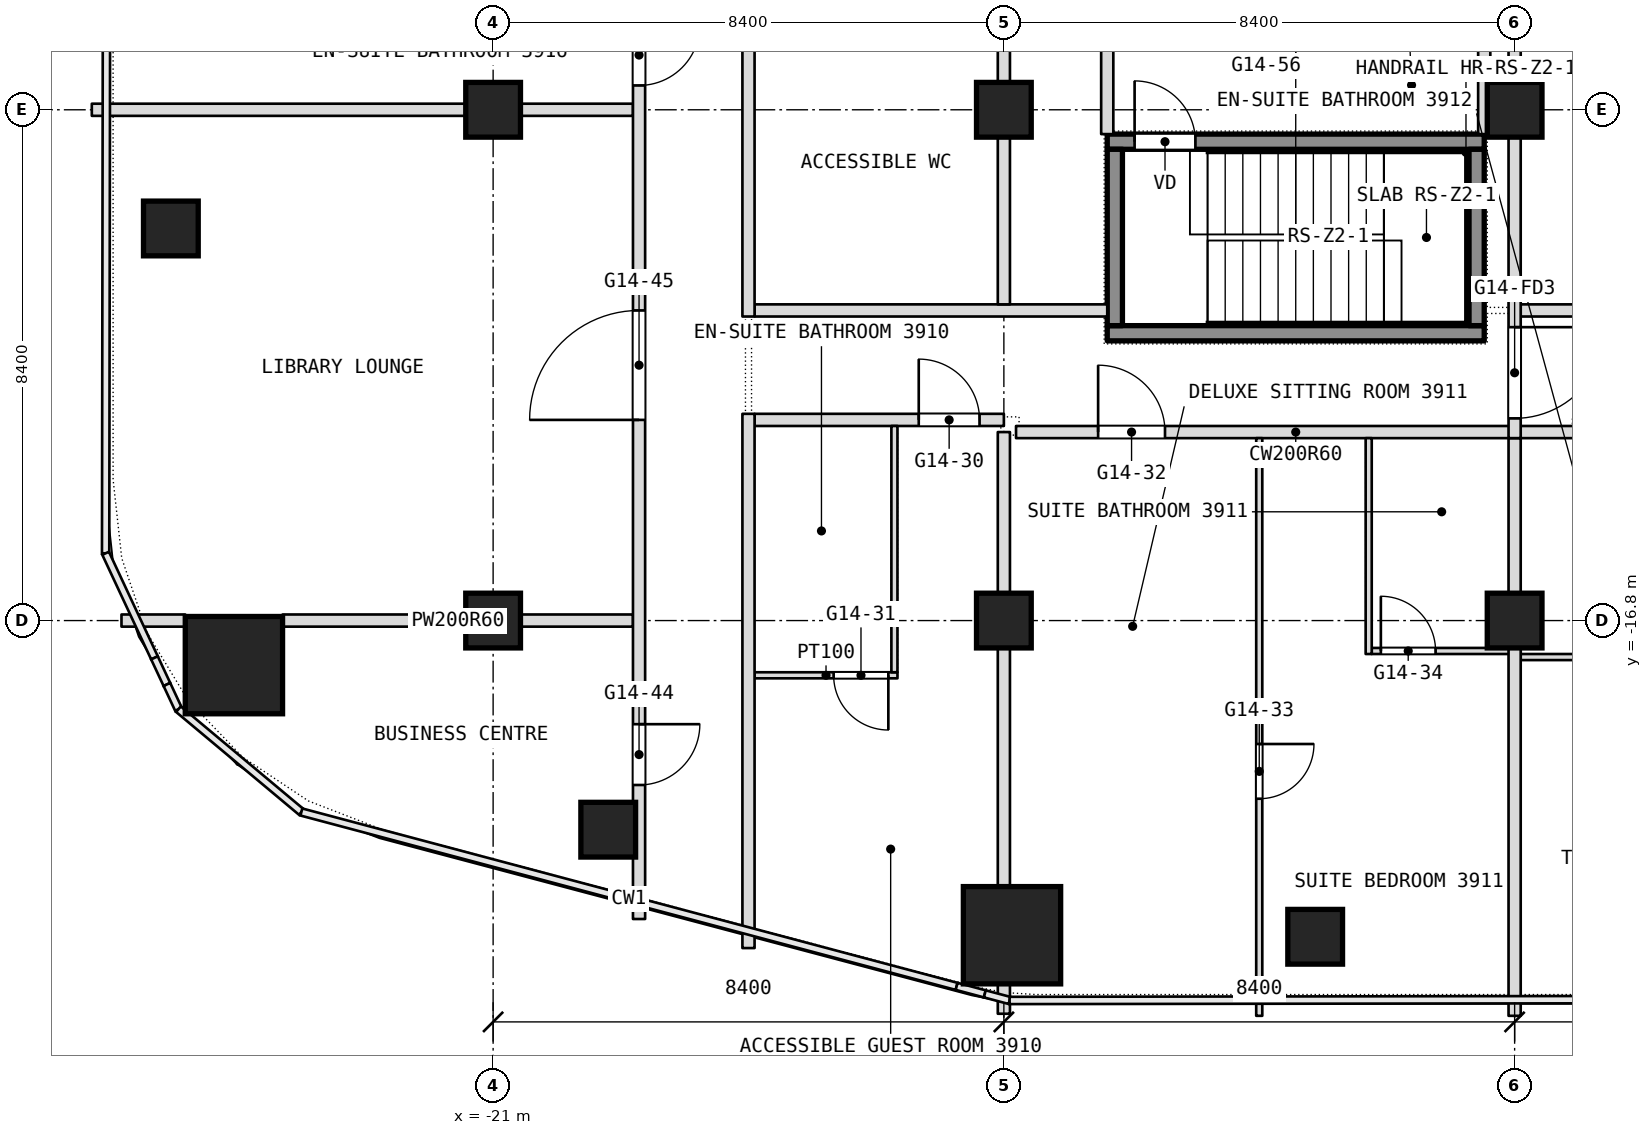
"""IFC4 building model, lengths in metres.
Left out: names, types, materials, properties, quantities, classifications, styles, units other than length and angle.
Written with IfcOpenShell. Run it as: python <this file> out.ifc"""

import sys

from ifc_helpers import new_model, si_unit, direction, frame, frame_2d, origin, origin_2d, place, context, subcontext, project, spatial, rectangle, extrude, element, fill, save


model = new_model("IFC4")
c1 = context("Model", 3, precision=1e-05, world=origin(), true_north=direction((0.0, 1.0)))
c2 = subcontext(c1, "Body", "Model", "MODEL_VIEW")
j1 = project(units=[si_unit("LENGTHUNIT", "METRE"), si_unit("PLANEANGLEUNIT", "RADIAN")], contexts=[c1])
p1 = place(None, origin())
s1 = spatial("IfcSite", under=j1, at=p1, CompositionType="ELEMENT")
p2 = place(p1, origin())
s2 = spatial("IfcBuilding", under=s1, at=p2, CompositionType="ELEMENT")
p3 = place(p2, frame((0.0, 0.0, 166.1)))
s3 = spatial("IfcBuildingStorey", under=s2, at=p3, CompositionType="ELEMENT", Elevation=166.1)
for number, where, z_axis, x_axis in (
    (1, (-25.263, -17.533, 0.0), (0.0, 0.0, 1.0), (1.0, 0.0, 0.0)),
    (2, (-12.466, -21.975, 0.0), (0.0, 0.0, 1.0), (1.0, 0.0, 0.0)),
):
    element("IfcColumn", number, at=place(p3, frame(where, z_axis=z_axis, x_axis=x_axis)), inside=s3, PredefinedType="COLUMN", context=c2, shape_type="SweptSolid", body=[
        extrude(rectangle(XDim=1.6, YDim=1.6, at=origin_2d()), origin(), (0.0, 0.0, 1.0), 3.6),
    ])
for number, where, z_axis, x_axis in (
    (3, (-21.0, -16.8, 0.0), (0.0, 0.0, 1.0), (1.0, 0.0, 0.0)),
    (4, (-21.0, -8.4, 0.0), (0.0, 0.0, 1.0), (1.0, 0.0, 0.0)),
    (5, (-12.6, -16.8, 0.0), (0.0, 0.0, 1.0), (1.0, 0.0, 0.0)),
    (6, (-12.6, -8.4, 0.0), (0.0, 0.0, 1.0), (1.0, 0.0, 0.0)),
    (7, (-4.2, -16.8, 0.0), (0.0, 0.0, 1.0), (1.0, 0.0, 0.0)),
    (8, (-4.2, -8.4, 0.0), (0.0, 0.0, 1.0), (1.0, 0.0, 0.0)),
    (9, (-26.3, -10.352, 0.0), (0.0, 0.0, 1.0), (1.0, 0.0, 0.0)),
    (10, (-7.48, -22.0, 0.0), (0.0, 0.0, 1.0), (1.0, 0.0, 0.0)),
    (11, (-19.107, -20.239, 0.0), (0.0, 0.0, 1.0), (1.0, 0.0, 0.0)),
):
    element("IfcColumn", number, at=place(p3, frame(where, z_axis=z_axis, x_axis=x_axis)), inside=s3, PredefinedType="COLUMN", context=c2, shape_type="SweptSolid", body=[
        extrude(rectangle(XDim=0.9, YDim=0.9, at=origin_2d()), origin(), (0.0, 0.0, 1.0), 3.6),
    ])
p4 = place(p3, frame((-16.7, -17.7, 0.0), z_axis=(0.0, 0.0, 1.0), x_axis=(1.0, 0.0, 0.0)))
e12 = element("IfcWall", 12, at=p4, inside=s3, PredefinedType="PARTITIONING", context=c2, shape_type="SweptSolid", body=[
    extrude(rectangle(XDim=2.35, YDim=0.1, at=frame_2d((1.175, 0.0))), origin(), (0.0, 0.0, 1.0), 3.3),
])
p5 = place(p4, frame((1.3, 0.0, 0.0)))
e13 = element("IfcOpeningElement", 13, at=p5, cuts=e12, PredefinedType="OPENING", context=c2, shape_type="SweptSolid", body=[
    extrude(rectangle(XDim=0.9, YDim=2.1, at=frame_2d((0.45, 1.05))), frame((0.0, 0.05, 0.0), z_axis=(0.0, -1.0, 0.0), x_axis=(1.0, 0.0, 0.0)), (0.0, 0.0, 1.0), 0.1),
])
p6 = place(p3, frame((-4.1, -17.4, 0.0), z_axis=(0.0, 0.0, 1.0), x_axis=(1.0, 0.0, 0.0)))
e14 = element("IfcWall", 14, at=p6, inside=s3, PredefinedType="PARTITIONING", context=c2, shape_type="SweptSolid", body=[
    extrude(rectangle(XDim=2.35, YDim=0.1, at=frame_2d((1.175, 0.0))), origin(), (0.0, 0.0, 1.0), 3.3),
])
p7 = place(p6, frame((1.3, 0.0, 0.0)))
e15 = element("IfcOpeningElement", 15, at=p7, cuts=e14, PredefinedType="OPENING", context=c2, shape_type="SweptSolid", body=[
    extrude(rectangle(XDim=0.9, YDim=2.1, at=frame_2d((0.45, 1.05))), frame((0.0, 0.05, 0.0), z_axis=(0.0, -1.0, 0.0), x_axis=(1.0, 0.0, 0.0)), (0.0, 0.0, 1.0), 0.1),
])
p8 = place(p3, frame((-6.55, -17.3, 0.0), z_axis=(0.0, 0.0, 1.0), x_axis=(1.0, 0.0, 0.0)))
e16 = element("IfcWall", 16, at=p8, inside=s3, PredefinedType="PARTITIONING", context=c2, shape_type="SweptSolid", body=[
    extrude(rectangle(XDim=2.45, YDim=0.1, at=frame_2d((1.225, 0.0))), origin(), (0.0, 0.0, 1.0), 3.3),
])
p9 = place(p8, frame((0.15, 0.0, 0.0)))
e17 = element("IfcOpeningElement", 17, at=p9, cuts=e16, PredefinedType="OPENING", context=c2, shape_type="SweptSolid", body=[
    extrude(rectangle(XDim=0.9, YDim=2.1, at=frame_2d((0.45, 1.05))), frame((0.0, 0.05, 0.0), z_axis=(0.0, -1.0, 0.0), x_axis=(1.0, 0.0, 0.0)), (0.0, 0.0, 1.0), 0.1),
])
p10 = place(p3, frame((-27.112, -16.8, 0.0), z_axis=(0.0, 0.0, 1.0), x_axis=(1.0, 0.0, 0.0)))
e18 = element("IfcWall", 18, at=p10, inside=s3, PredefinedType="PARTITIONING", context=c2, shape_type="SweptSolid", body=[
    extrude(rectangle(XDim=1.049, YDim=0.2, at=frame_2d((0.524, 0.0))), origin(), (0.0, 0.0, 1.0), 3.3),
])
p11 = place(p3, frame((-24.463, -16.8, 0.0), z_axis=(0.0, 0.0, 1.0), x_axis=(1.0, 0.0, 0.0)))
e19 = element("IfcWall", 19, at=p11, inside=s3, PredefinedType="PARTITIONING", context=c2, shape_type="SweptSolid", body=[
    extrude(rectangle(XDim=5.763, YDim=0.2, at=frame_2d((2.881, 0.0))), origin(), (0.0, 0.0, 1.0), 2.85),
])
p12 = place(p3, frame((-12.4, -13.7, 0.0), z_axis=(0.0, 0.0, 1.0), x_axis=(1.0, 0.0, 0.0)))
e20 = element("IfcWall", 20, at=p12, inside=s3, PredefinedType="PARTITIONING", context=c2, shape_type="SweptSolid", body=[
    extrude(rectangle(XDim=9.2, YDim=0.2, at=frame_2d((4.6, 0.0))), origin(), (0.0, 0.0, 1.0), 3.3),
])
p13 = place(p12, frame((1.35, 0.0, 0.0)))
e21 = element("IfcOpeningElement", 21, at=p13, cuts=e20, PredefinedType="OPENING", context=c2, shape_type="SweptSolid", body=[
    extrude(rectangle(XDim=1.1, YDim=2.1, at=frame_2d((0.55, 1.05))), frame((0.0, 0.1, 0.0), z_axis=(0.0, -1.0, 0.0), x_axis=(1.0, 0.0, 0.0)), (0.0, 0.0, 1.0), 0.2),
])
p14 = place(p3, frame((-16.7, -13.5, 0.0), z_axis=(0.0, 0.0, 1.0), x_axis=(1.0, 0.0, 0.0)))
e22 = element("IfcWall", 22, at=p14, inside=s3, PredefinedType="PARTITIONING", context=c2, shape_type="SweptSolid", body=[
    extrude(rectangle(XDim=4.1, YDim=0.2, at=frame_2d((2.05, 0.0))), origin(), (0.0, 0.0, 1.0), 3.3),
])
p15 = place(p14, frame((2.7, 0.0, 0.0)))
e23 = element("IfcOpeningElement", 23, at=p15, cuts=e22, PredefinedType="OPENING", context=c2, shape_type="SweptSolid", body=[
    extrude(rectangle(XDim=1.0, YDim=2.1, at=frame_2d((0.5, 1.05))), frame((0.0, 0.1, 0.0), z_axis=(0.0, -1.0, 0.0), x_axis=(1.0, 0.0, 0.0)), (0.0, 0.0, 1.0), 0.2),
])
p16 = place(p3, frame((-16.7, -11.7, 0.0), z_axis=(0.0, 0.0, 1.0), x_axis=(1.0, 0.0, 0.0)))
e24 = element("IfcWall", 24, at=p16, inside=s3, PredefinedType="PARTITIONING", context=c2, shape_type="SweptSolid", body=[
    extrude(rectangle(XDim=5.8, YDim=0.2, at=frame_2d((2.9, 0.0))), origin(), (0.0, 0.0, 1.0), 3.3),
])
p17 = place(p3, frame((-4.1, -11.7, 0.0), z_axis=(0.0, 0.0, 1.0), x_axis=(1.0, 0.0, 0.0)))
e25 = element("IfcWall", 25, at=p17, inside=s3, PredefinedType="PARTITIONING", context=c2, shape_type="SweptSolid", body=[
    extrude(rectangle(XDim=20.8, YDim=0.2, at=frame_2d((10.4, 0.0))), origin(), (0.0, 0.0, 1.0), 3.3),
])
p18 = place(p17, frame((14.1, 0.0, 0.0)))
e26 = element("IfcOpeningElement", 26, at=p18, cuts=e25, PredefinedType="OPENING", context=c2, shape_type="SweptSolid", body=[
    extrude(rectangle(XDim=1.0, YDim=2.1, at=frame_2d((0.5, 1.05))), frame((0.0, 0.1, 0.0), z_axis=(0.0, -1.0, 0.0), x_axis=(1.0, 0.0, 0.0)), (0.0, 0.0, 1.0), 0.2),
])
p19 = place(p17, frame((5.7, 0.0, 0.0)))
e27 = element("IfcOpeningElement", 27, at=p19, cuts=e25, PredefinedType="OPENING", context=c2, shape_type="SweptSolid", body=[
    extrude(rectangle(XDim=1.0, YDim=2.1, at=frame_2d((0.5, 1.05))), frame((0.0, 0.1, 0.0), z_axis=(0.0, -1.0, 0.0), x_axis=(1.0, 0.0, 0.0)), (0.0, 0.0, 1.0), 0.2),
])
p20 = place(p3, frame((-27.6, -8.4, 0.0), z_axis=(0.0, 0.0, 1.0), x_axis=(1.0, 0.0, 0.0)))
e28 = element("IfcWall", 28, at=p20, inside=s3, PredefinedType="PARTITIONING", context=c2, shape_type="SweptSolid", body=[
    extrude(rectangle(XDim=8.9, YDim=0.2, at=frame_2d((4.45, 0.0))), origin(), (0.0, 0.0, 1.0), 2.85),
])
p21 = place(p3, frame((-4.2, -23.3, 0.0), z_axis=(0.0, 0.0, 1.0), x_axis=(0.0, 1.0, 0.0)))
e29 = element("IfcWall", 29, at=p21, inside=s3, PredefinedType="PARTITIONING", context=c2, shape_type="SweptSolid", body=[
    extrude(rectangle(XDim=9.5, YDim=0.2, at=frame_2d((4.75, 0.0))), origin(), (0.0, 0.0, 1.0), 2.486),
])
p22 = place(p3, frame((-4.2, -13.8, 0.0), z_axis=(0.0, 0.0, 1.0), x_axis=(0.0, 1.0, 0.0)))
e30 = element("IfcWall", 30, at=p22, inside=s3, PredefinedType="PARTITIONING", context=c2, shape_type="SweptSolid", body=[
    extrude(rectangle(XDim=13.8, YDim=0.2, at=frame_2d((6.9, 0.0))), origin(), (0.0, 0.0, 1.0), 2.486),
])
p23 = place(p22, frame((12.15, 0.0, 0.0)))
e31 = element("IfcOpeningElement", 31, at=p23, cuts=e30, PredefinedType="OPENING", context=c2, shape_type="SweptSolid", body=[
    extrude(rectangle(XDim=1.5, YDim=2.1, at=frame_2d((0.75, 1.05))), frame((0.0, 0.1, 0.0), z_axis=(0.0, -1.0, 0.0), x_axis=(1.0, 0.0, 0.0)), (0.0, 0.0, 1.0), 0.2),
])
p24 = place(p22, frame((0.325, 0.0, 0.0)))
e32 = element("IfcOpeningElement", 32, at=p24, cuts=e30, PredefinedType="OPENING", context=c2, shape_type="SweptSolid", body=[
    extrude(rectangle(XDim=1.5, YDim=2.1, at=frame_2d((0.75, 1.05))), frame((0.0, 0.1, 0.0), z_axis=(0.0, -1.0, 0.0), x_axis=(1.0, 0.0, 0.0)), (0.0, 0.0, 1.0), 0.2),
])
p25 = place(p3, frame((-4.7, -8.8, 0.0), z_axis=(0.0, 0.0, 1.0), x_axis=(0.0, 1.0, 0.0)))
e33 = element("IfcWall", 33, at=p25, inside=s3, PredefinedType="PARTITIONING", context=c2, shape_type="SweptSolid", body=[
    extrude(rectangle(XDim=1.7, YDim=0.2, at=frame_2d((0.85, 0.0))), origin(), (0.0, 0.0, 1.0), 3.3),
])
p26 = place(p3, frame((-6.6, -17.35, 0.0), z_axis=(0.0, 0.0, 1.0), x_axis=(0.0, 1.0, 0.0)))
e34 = element("IfcWall", 34, at=p26, inside=s3, PredefinedType="PARTITIONING", context=c2, shape_type="SweptSolid", body=[
    extrude(rectangle(XDim=3.55, YDim=0.1, at=frame_2d((1.775, 0.0))), origin(), (0.0, 0.0, 1.0), 3.3),
])
p27 = place(p3, frame((-8.4, -23.3, 0.0), z_axis=(0.0, 0.0, 1.0), x_axis=(0.0, 1.0, 0.0)))
e35 = element("IfcWall", 35, at=p27, inside=s3, PredefinedType="PARTITIONING", context=c2, shape_type="SweptSolid", body=[
    extrude(rectangle(XDim=9.5, YDim=0.1, at=frame_2d((4.75, 0.0))), origin(), (0.0, 0.0, 1.0), 3.3),
])
p28 = place(p27, frame((3.57, 0.0, 0.0)))
e36 = element("IfcOpeningElement", 36, at=p28, cuts=e35, PredefinedType="OPENING", context=c2, shape_type="SweptSolid", body=[
    extrude(rectangle(XDim=0.9, YDim=2.1, at=frame_2d((0.45, 1.05))), frame((0.0, 0.05, 0.0), z_axis=(0.0, -1.0, 0.0), x_axis=(1.0, 0.0, 0.0)), (0.0, 0.0, 1.0), 0.1),
])
p29 = place(p3, frame((-10.9, -8.8, 0.0), z_axis=(0.0, 0.0, 1.0), x_axis=(0.0, 1.0, 0.0)))
e37 = element("IfcWall", 37, at=p29, inside=s3, PredefinedType="PARTITIONING", context=c2, shape_type="SweptSolid", body=[
    extrude(rectangle(XDim=1.5, YDim=0.2, at=frame_2d((0.75, 0.0))), origin(), (0.0, 0.0, 1.0), 3.3),
])
p30 = place(p3, frame((-12.6, -23.266, 0.0), z_axis=(0.0, 0.0, 1.0), x_axis=(0.0, 1.0, 0.0)))
e38 = element("IfcWall", 38, at=p30, inside=s3, PredefinedType="PARTITIONING", context=c2, shape_type="SweptSolid", body=[
    extrude(rectangle(XDim=0.491, YDim=0.2, at=frame_2d((0.246, 0.0))), origin(), (0.0, 0.0, 1.0), 3.3),
])
p31 = place(p3, frame((-12.6, -21.175, 0.0), z_axis=(0.0, 0.0, 1.0), x_axis=(0.0, 1.0, 0.0)))
e39 = element("IfcWall", 39, at=p31, inside=s3, PredefinedType="PARTITIONING", context=c2, shape_type="SweptSolid", body=[
    extrude(rectangle(XDim=7.475, YDim=0.2, at=frame_2d((3.738, 0.0))), origin(), (0.0, 0.0, 1.0), 2.486),
])
p32 = place(p3, frame((-12.6, -11.6, 0.0), z_axis=(0.0, 0.0, 1.0), x_axis=(0.0, 1.0, 0.0)))
e40 = element("IfcWall", 40, at=p32, inside=s3, PredefinedType="PARTITIONING", context=c2, shape_type="SweptSolid", body=[
    extrude(rectangle(XDim=9.7, YDim=0.2, at=frame_2d((4.85, 0.0))), origin(), (0.0, 0.0, 1.0), 2.486),
])
p33 = place(p3, frame((-14.4, -17.65, 0.0), z_axis=(0.0, 0.0, 1.0), x_axis=(0.0, 1.0, 0.0)))
e41 = element("IfcWall", 41, at=p33, inside=s3, PredefinedType="PARTITIONING", context=c2, shape_type="SweptSolid", body=[
    extrude(rectangle(XDim=4.05, YDim=0.1, at=frame_2d((2.025, 0.0))), origin(), (0.0, 0.0, 1.0), 3.3),
])
p34 = place(p3, frame((-16.8, -22.186, 0.0), z_axis=(0.0, 0.0, 1.0), x_axis=(0.0, 1.0, 0.0)))
e42 = element("IfcWall", 42, at=p34, inside=s3, PredefinedType="PARTITIONING", context=c2, shape_type="SweptSolid", body=[
    extrude(rectangle(XDim=8.786, YDim=0.2, at=frame_2d((4.393, 0.0))), origin(), (0.0, 0.0, 1.0), 3.3),
])
p35 = place(p3, frame((-16.8, -11.8, 0.0), z_axis=(0.0, 0.0, 1.0), x_axis=(0.0, 1.0, 0.0)))
e43 = element("IfcWall", 43, at=p35, inside=s3, PredefinedType="PARTITIONING", context=c2, shape_type="SweptSolid", body=[
    extrude(rectangle(XDim=9.9, YDim=0.2, at=frame_2d((4.95, 0.0))), origin(), (0.0, 0.0, 1.0), 3.3),
])
p36 = place(p3, frame((-18.6, -21.708, 0.0), z_axis=(0.0, 0.0, 1.0), x_axis=(0.0, 1.0, 0.0)))
e44 = element("IfcWall", 44, at=p36, inside=s3, PredefinedType="PARTITIONING", context=c2, shape_type="SweptSolid", body=[
    extrude(rectangle(XDim=28.608, YDim=0.2, at=frame_2d((14.304, 0.0))), origin(), (0.0, 0.0, 1.0), 3.3),
])
p37 = place(p36, frame((2.204, 0.0, 0.0)))
e45 = element("IfcOpeningElement", 45, at=p37, cuts=e44, PredefinedType="OPENING", context=c2, shape_type="SweptSolid", body=[
    extrude(rectangle(XDim=1.0, YDim=2.1, at=frame_2d((0.5, 1.05))), frame((0.0, 0.1, 0.0), z_axis=(0.0, -1.0, 0.0), x_axis=(1.0, 0.0, 0.0)), (0.0, 0.0, 1.0), 0.2),
])
p38 = place(p36, frame((8.208, 0.0, 0.0)))
e46 = element("IfcOpeningElement", 46, at=p38, cuts=e44, PredefinedType="OPENING", context=c2, shape_type="SweptSolid", body=[
    extrude(rectangle(XDim=1.8, YDim=2.1, at=frame_2d((0.9, 1.05))), frame((0.0, 0.1, 0.0), z_axis=(0.0, -1.0, 0.0), x_axis=(1.0, 0.0, 0.0)), (0.0, 0.0, 1.0), 0.2),
])
p39 = place(p36, frame((13.708, 0.0, 0.0)))
e47 = element("IfcOpeningElement", 47, at=p39, cuts=e44, PredefinedType="OPENING", context=c2, shape_type="SweptSolid", body=[
    extrude(rectangle(XDim=1.0, YDim=2.1, at=frame_2d((0.5, 1.05))), frame((0.0, 0.1, 0.0), z_axis=(0.0, -1.0, 0.0), x_axis=(1.0, 0.0, 0.0)), (0.0, 0.0, 1.0), 0.2),
])
p40 = place(p36, frame((20.308, 0.0, 0.0)))
e48 = element("IfcOpeningElement", 48, at=p40, cuts=e44, PredefinedType="OPENING", context=c2, shape_type="SweptSolid", body=[
    extrude(rectangle(XDim=1.0, YDim=2.1, at=frame_2d((0.5, 1.05))), frame((0.0, 0.1, 0.0), z_axis=(0.0, -1.0, 0.0), x_axis=(1.0, 0.0, 0.0)), (0.0, 0.0, 1.0), 0.2),
])
p41 = place(p3, frame((-10.9, -12.075, 0.1), z_axis=(0.0, 0.0, 1.0), x_axis=(1.0, 0.0, 0.0)))
e49 = element("IfcWall", 49, at=p41, inside=s3, PredefinedType="SHEAR", context=c2, shape_type="SweptSolid", body=[
    extrude(rectangle(XDim=6.2, YDim=0.25, at=frame_2d((3.1, 0.0))), origin(), (0.0, 0.0, 1.0), 3.6),
])
p42 = place(p3, frame((-10.9, -8.925, 0.1), z_axis=(0.0, 0.0, 1.0), x_axis=(1.0, 0.0, 0.0)))
e50 = element("IfcWall", 50, at=p42, inside=s3, PredefinedType="SHEAR", context=c2, shape_type="SweptSolid", body=[
    extrude(rectangle(XDim=6.2, YDim=0.25, at=frame_2d((3.1, 0.0))), origin(), (0.0, 0.0, 1.0), 3.6),
])
p43 = place(p42, frame((0.45, 0.0, 0.0)))
e51 = element("IfcOpeningElement", 51, at=p43, cuts=e50, PredefinedType="OPENING", context=c2, shape_type="SweptSolid", body=[
    extrude(rectangle(XDim=1.0, YDim=2.1, at=frame_2d((0.5, 1.05))), frame((0.0, 0.125, 0.0), z_axis=(0.0, -1.0, 0.0), x_axis=(1.0, 0.0, 0.0)), (0.0, 0.0, 1.0), 0.25),
])
for number, where, z_axis, x_axis in (
    (52, (-10.775, -11.95, 0.1), (0.0, 0.0, 1.0), (0.0, 1.0, 0.0)),
    (53, (-4.825, -11.95, 0.1), (0.0, 0.0, 1.0), (0.0, 1.0, 0.0)),
):
    element("IfcWall", number, at=place(p3, frame(where, z_axis=z_axis, x_axis=x_axis)), inside=s3, PredefinedType="SHEAR", context=c2, shape_type="SweptSolid", body=[
        extrude(rectangle(XDim=2.9, YDim=0.25, at=frame_2d((1.45, 0.0))), origin(), (0.0, 0.0, 1.0), 3.6),
    ])
p44 = place(p5, origin())
e54 = element("IfcDoor", 54, at=p44, inside=s3, OperationType="SINGLE_SWING_RIGHT", PredefinedType="DOOR", context=c2, shape_type="SweptSolid", body=[
    extrude(rectangle(XDim=0.9, YDim=2.1, at=frame_2d((0.45, 1.05))), frame((0.0, 0.025, 0.0), z_axis=(0.0, -1.0, 0.0), x_axis=(1.0, 0.0, 0.0)), (0.0, 0.0, 1.0), 0.05),
])
fill(e13, e54)
p45 = place(p9, origin())
e55 = element("IfcDoor", 55, at=p45, inside=s3, OperationType="SINGLE_SWING_LEFT", PredefinedType="DOOR", context=c2, shape_type="SweptSolid", body=[
    extrude(rectangle(XDim=0.9, YDim=2.1, at=frame_2d((0.45, 1.05))), frame((0.0, 0.025, 0.0), z_axis=(0.0, -1.0, 0.0), x_axis=(1.0, 0.0, 0.0)), (0.0, 0.0, 1.0), 0.05),
])
fill(e17, e55)
p46 = place(p13, origin())
e56 = element("IfcDoor", 56, at=p46, inside=s3, OperationType="SINGLE_SWING_RIGHT", PredefinedType="DOOR", context=c2, shape_type="SweptSolid", body=[
    extrude(rectangle(XDim=1.1, YDim=2.1, at=frame_2d((0.55, 1.05))), frame((0.0, 0.025, 0.0), z_axis=(0.0, -1.0, 0.0), x_axis=(1.0, 0.0, 0.0)), (0.0, 0.0, 1.0), 0.05),
])
fill(e21, e56)
p47 = place(p15, origin())
e57 = element("IfcDoor", 57, at=p47, inside=s3, OperationType="SINGLE_SWING_RIGHT", PredefinedType="DOOR", context=c2, shape_type="SweptSolid", body=[
    extrude(rectangle(XDim=1.0, YDim=2.1, at=frame_2d((0.5, 1.05))), frame((0.0, 0.025, 0.0), z_axis=(0.0, -1.0, 0.0), x_axis=(1.0, 0.0, 0.0)), (0.0, 0.0, 1.0), 0.05),
])
fill(e23, e57)
p48 = place(p28, origin())
e58 = element("IfcDoor", 58, at=p48, inside=s3, OperationType="SINGLE_SWING_RIGHT", PredefinedType="DOOR", context=c2, shape_type="SweptSolid", body=[
    extrude(rectangle(XDim=0.9, YDim=2.1, at=frame_2d((0.45, 1.05))), frame((0.0, 0.025, 0.0), z_axis=(0.0, -1.0, 0.0), x_axis=(1.0, 0.0, 0.0)), (0.0, 0.0, 1.0), 0.05),
])
fill(e36, e58)
p49 = place(p37, origin())
e59 = element("IfcDoor", 59, at=p49, inside=s3, OperationType="SINGLE_SWING_RIGHT", PredefinedType="DOOR", context=c2, shape_type="SweptSolid", body=[
    extrude(rectangle(XDim=1.0, YDim=2.1, at=frame_2d((0.5, 1.05))), frame((0.0, 0.025, 0.0), z_axis=(0.0, -1.0, 0.0), x_axis=(1.0, 0.0, 0.0)), (0.0, 0.0, 1.0), 0.05),
])
fill(e45, e59)
p50 = place(p38, origin())
e60 = element("IfcDoor", 60, at=p50, inside=s3, OperationType="DOUBLE_DOOR_SINGLE_SWING", PredefinedType="DOOR", context=c2, shape_type="SweptSolid", body=[
    extrude(rectangle(XDim=1.8, YDim=2.1, at=frame_2d((0.9, 1.05))), frame((0.0, 0.025, 0.0), z_axis=(0.0, -1.0, 0.0), x_axis=(1.0, 0.0, 0.0)), (0.0, 0.0, 1.0), 0.05),
])
fill(e46, e60)
p51 = place(p39, origin())
e61 = element("IfcDoor", 61, at=p51, inside=s3, OperationType="SINGLE_SWING_LEFT", PredefinedType="DOOR", context=c2, shape_type="SweptSolid", body=[
    extrude(rectangle(XDim=1.0, YDim=2.1, at=frame_2d((0.5, 1.05))), frame((0.0, 0.025, 0.0), z_axis=(0.0, -1.0, 0.0), x_axis=(1.0, 0.0, 0.0)), (0.0, 0.0, 1.0), 0.05),
])
fill(e47, e61)
p52 = place(p43, origin())
e62 = element("IfcDoor", 62, at=p52, inside=s3, OperationType="SINGLE_SWING_LEFT", PredefinedType="DOOR", context=c2, shape_type="SweptSolid", body=[
    extrude(rectangle(XDim=1.0, YDim=2.1, at=frame_2d((0.5, 1.05))), frame((0.0, 0.025, 0.0), z_axis=(0.0, -1.0, 0.0), x_axis=(1.0, 0.0, 0.0)), (0.0, 0.0, 1.0), 0.05),
])
fill(e51, e62)
p53 = place(p24, origin())
e63 = element("IfcDoor", 63, at=p53, inside=s3, OperationType="DOUBLE_DOOR_DOUBLE_SWING", PredefinedType="DOOR", context=c2, shape_type="SweptSolid", body=[
    extrude(rectangle(XDim=1.5, YDim=2.1, at=frame_2d((0.75, 1.05))), frame((0.0, 0.025, 0.0), z_axis=(0.0, -1.0, 0.0), x_axis=(1.0, 0.0, 0.0)), (0.0, 0.0, 1.0), 0.05),
])
fill(e32, e63)
save(model, sys.argv[1])
